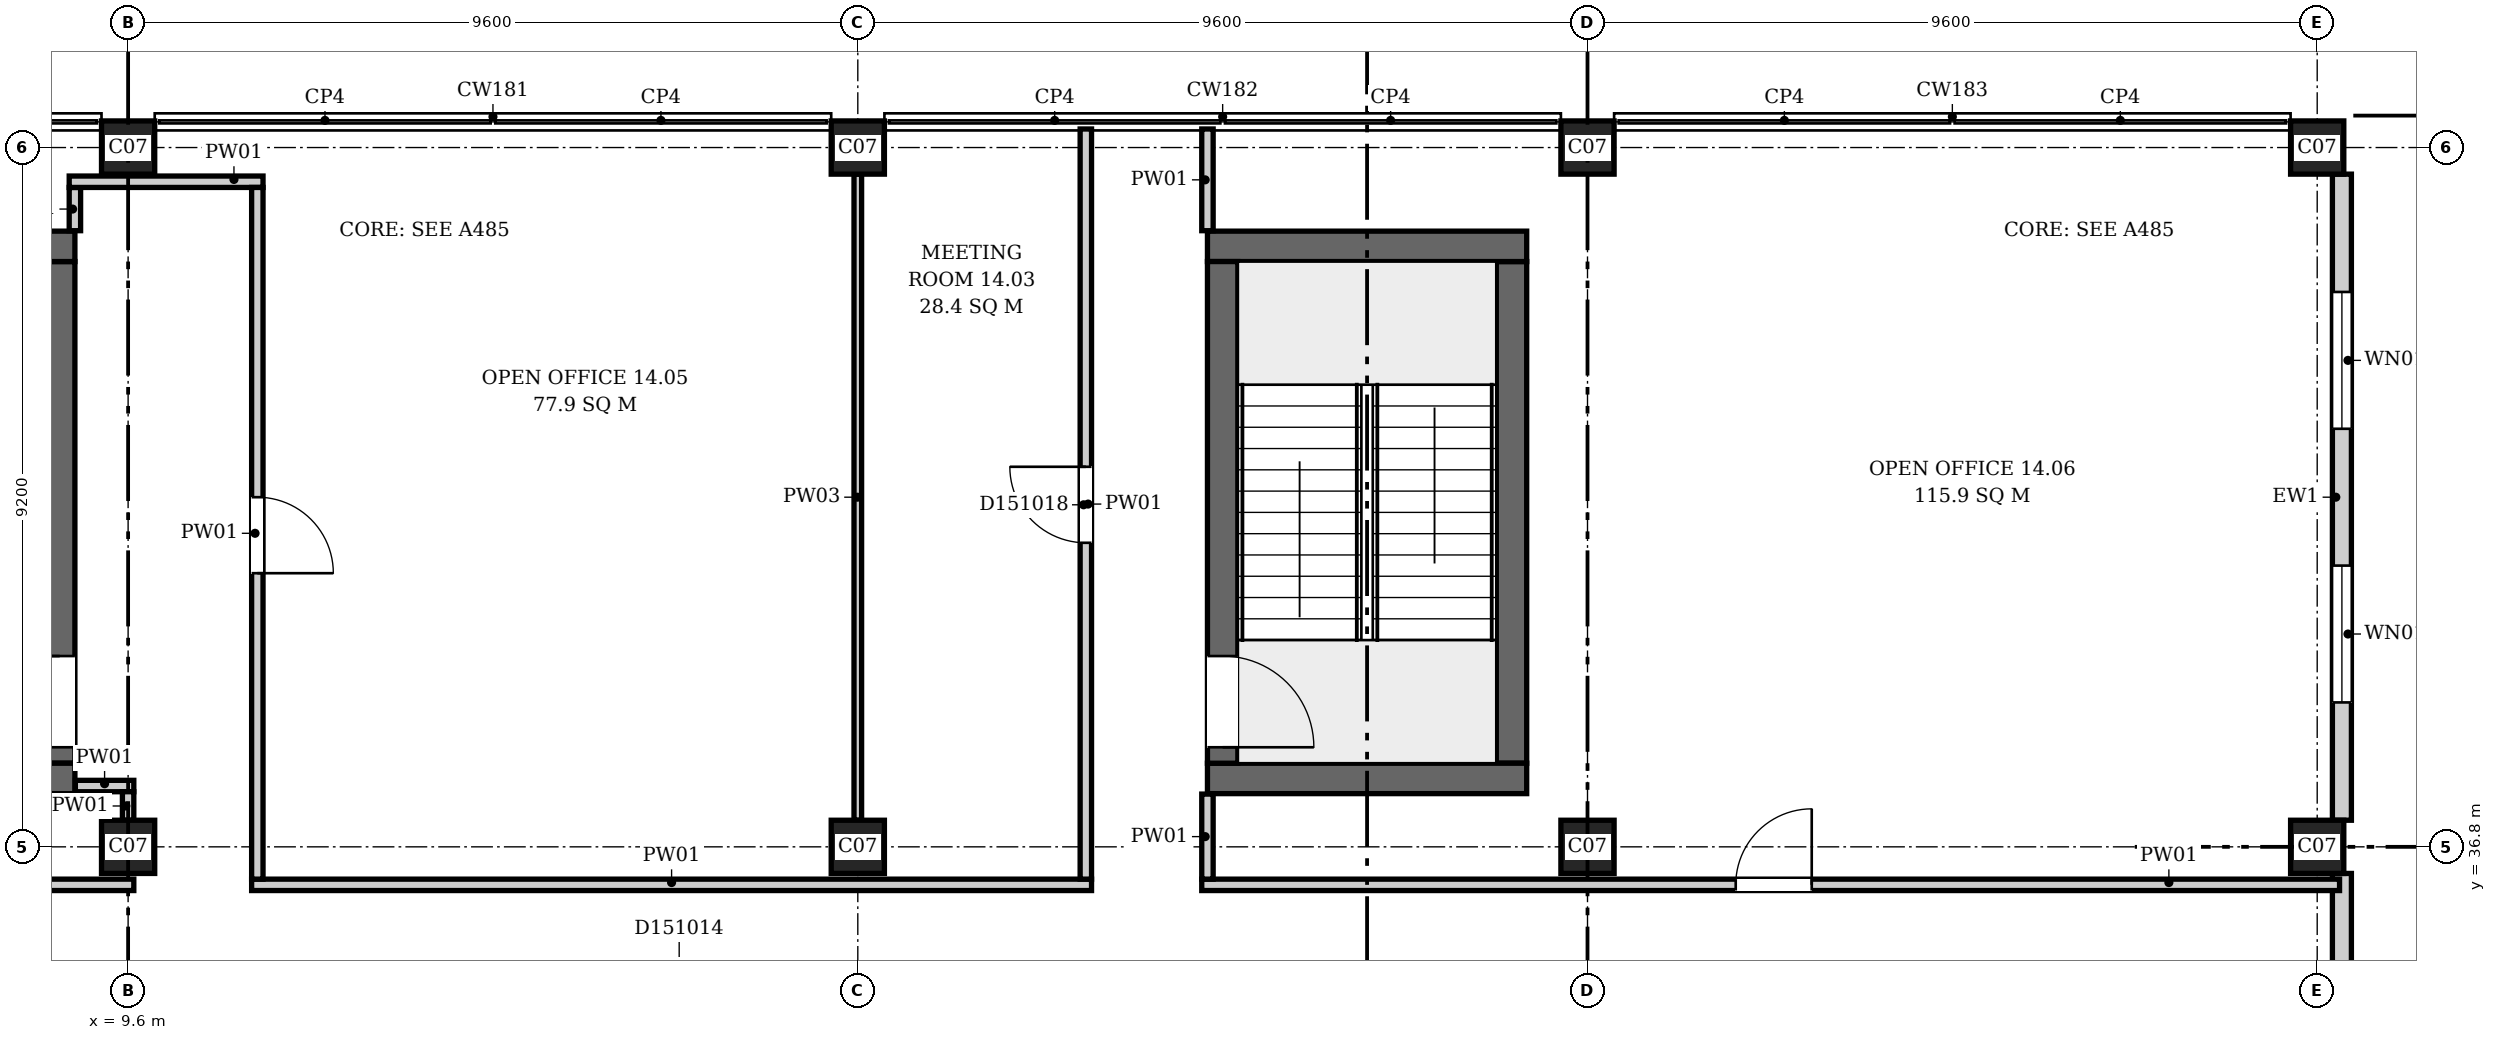
"""IFC4 building model, lengths in metres.
Left out: names, types, materials, properties, quantities, classifications, styles, units other than length and angle.
Written with IfcOpenShell. Run it as: python <this file> out.ifc"""

import sys

from ifc_helpers import new_model, si_unit, direction, frame, frame_2d, origin, origin_2d, place, context, subcontext, project, spatial, rectangle, extrude, element, fill, save


model = new_model("IFC4")
c1 = context("Model", 3, precision=1e-05, world=origin(), true_north=direction((0.0, 1.0)))
c2 = subcontext(c1, "Body", "Model", "MODEL_VIEW")
j1 = project(units=[si_unit("LENGTHUNIT", "METRE"), si_unit("PLANEANGLEUNIT", "RADIAN")], contexts=[c1])
p1 = place(None, origin())
s1 = spatial("IfcSite", under=j1, at=p1, CompositionType="ELEMENT")
p2 = place(p1, origin())
s2 = spatial("IfcBuilding", under=s1, at=p2, CompositionType="ELEMENT")
p3 = place(p2, frame((0.0, 0.0, 69.7)))
s3 = spatial("IfcBuildingStorey", under=s2, at=p3, CompositionType="ELEMENT", Elevation=69.7)
for number, where, z_axis, x_axis in (
    (1, (4.7, 37.7, 0.0), (0.0, 0.0, 1.0), (1.0, 0.0, 0.0)),
    (2, (4.7, 44.7, 0.0), (0.0, 0.0, 1.0), (1.0, 0.0, 0.0)),
):
    element("IfcWall", number, at=place(p3, frame(where, z_axis=z_axis, x_axis=x_axis)), inside=s3, PredefinedType="SHEAR", context=c2, shape_type="SweptSolid", body=[
        extrude(rectangle(XDim=4.2, YDim=0.4, at=frame_2d((2.1, 0.0))), origin(), (0.0, 0.0, 1.0), 4.2),
    ])
p4 = place(p3, frame((8.7, 37.9, 0.0), z_axis=(0.0, 0.0, 1.0), x_axis=(0.0, 1.0, 0.0)))
e3 = element("IfcWall", 3, at=p4, inside=s3, PredefinedType="SHEAR", context=c2, shape_type="SweptSolid", body=[
    extrude(rectangle(XDim=6.6, YDim=0.4, at=frame_2d((3.3, 0.0))), origin(), (0.0, 0.0, 1.0), 4.2),
])
p5 = place(p4, frame((0.21, 0.0, 0.0)))
e4 = element("IfcOpeningElement", 4, at=p5, cuts=e3, PredefinedType="OPENING", context=c2, shape_type="SweptSolid", body=[
    extrude(rectangle(XDim=1.2, YDim=2.1, at=frame_2d((0.6, 1.05))), frame((0.0, 0.21, 0.0), z_axis=(0.0, -1.0, 0.0), x_axis=(1.0, 0.0, 0.0)), (0.0, 0.0, 1.0), 0.42),
])
for number, where, z_axis, x_axis in (
    (5, (23.8, 37.7, 0.0), (0.0, 0.0, 1.0), (1.0, 0.0, 0.0)),
    (6, (23.8, 44.7, 0.0), (0.0, 0.0, 1.0), (1.0, 0.0, 0.0)),
):
    element("IfcWall", number, at=place(p3, frame(where, z_axis=z_axis, x_axis=x_axis)), inside=s3, PredefinedType="SHEAR", context=c2, shape_type="SweptSolid", body=[
        extrude(rectangle(XDim=4.2, YDim=0.4, at=frame_2d((2.1, 0.0))), origin(), (0.0, 0.0, 1.0), 4.2),
    ])
p6 = place(p3, frame((24.0, 37.9, 0.0), z_axis=(0.0, 0.0, 1.0), x_axis=(0.0, 1.0, 0.0)))
e7 = element("IfcWall", 7, at=p6, inside=s3, PredefinedType="SHEAR", context=c2, shape_type="SweptSolid", body=[
    extrude(rectangle(XDim=6.6, YDim=0.4, at=frame_2d((3.3, 0.0))), origin(), (0.0, 0.0, 1.0), 4.2),
])
p7 = place(p6, frame((0.21, 0.0, 0.0)))
e8 = element("IfcOpeningElement", 8, at=p7, cuts=e7, PredefinedType="OPENING", context=c2, shape_type="SweptSolid", body=[
    extrude(rectangle(XDim=1.2, YDim=2.1, at=frame_2d((0.6, 1.05))), frame((0.0, 0.21, 0.0), z_axis=(0.0, -1.0, 0.0), x_axis=(1.0, 0.0, 0.0)), (0.0, 0.0, 1.0), 0.42),
])
p8 = place(p3, frame((27.8, 37.9, 0.0), z_axis=(0.0, 0.0, 1.0), x_axis=(0.0, 1.0, 0.0)))
e9 = element("IfcWall", 9, at=p8, inside=s3, PredefinedType="SHEAR", context=c2, shape_type="SweptSolid", body=[
    extrude(rectangle(XDim=6.6, YDim=0.4, at=frame_2d((3.3, 0.0))), origin(), (0.0, 0.0, 1.0), 4.2),
])
for number, where, z_axis, x_axis in (
    (10, (9.6, 36.8, 0.0), (0.0, 0.0, 1.0), (1.0, 0.0, 0.0)),
    (11, (19.2, 36.8, 0.0), (0.0, 0.0, 1.0), (1.0, 0.0, 0.0)),
    (12, (28.8, 36.8, 0.0), (0.0, 0.0, 1.0), (1.0, 0.0, 0.0)),
    (13, (38.4, 36.8, 0.0), (0.0, 0.0, 1.0), (1.0, 0.0, 0.0)),
    (14, (9.6, 46.0, 0.0), (0.0, 0.0, 1.0), (1.0, 0.0, 0.0)),
    (15, (19.2, 46.0, 0.0), (0.0, 0.0, 1.0), (1.0, 0.0, 0.0)),
    (16, (28.8, 46.0, 0.0), (0.0, 0.0, 1.0), (1.0, 0.0, 0.0)),
    (17, (38.4, 46.0, 0.0), (0.0, 0.0, 1.0), (1.0, 0.0, 0.0)),
):
    element("IfcColumn", number, at=place(p3, frame(where, z_axis=z_axis, x_axis=x_axis)), inside=s3, PredefinedType="COLUMN", context=c2, shape_type="SweptSolid", body=[
        extrude(rectangle(XDim=0.7, YDim=0.7, at=origin_2d()), origin(), (0.0, 0.0, 1.0), 4.2),
    ])
p9 = place(p3, frame((38.725, 27.95, 0.0), z_axis=(0.0, 0.0, 1.0), x_axis=(0.0, 1.0, 0.0)))
e18 = element("IfcWall", 18, at=p9, inside=s3, PredefinedType="ELEMENTEDWALL", context=c2, shape_type="SweptSolid", body=[
    extrude(rectangle(XDim=8.5, YDim=0.25, at=frame_2d((4.25, 0.0))), origin(), (0.0, 0.0, 1.0), 3.9),
])
p10 = place(p9, frame((4.35, 0.0, 0.0)))
e19 = element("IfcOpeningElement", 19, at=p10, cuts=e18, PredefinedType="OPENING", context=c2, shape_type="SweptSolid", body=[
    extrude(rectangle(XDim=1.8, YDim=2.4, at=frame_2d((0.9, 1.2))), frame((0.0, 0.135, 0.0), z_axis=(0.0, -1.0, 0.0), x_axis=(1.0, 0.0, 0.0)), (0.0, 0.0, 1.0), 0.27),
])
p11 = place(p9, frame((1.55, 0.0, 0.9)))
e20 = element("IfcOpeningElement", 20, at=p11, cuts=e18, PredefinedType="OPENING", context=c2, shape_type="SweptSolid", body=[
    extrude(rectangle(XDim=1.8, YDim=2.6, at=frame_2d((0.9, 1.3))), frame((0.0, 0.135, 0.0), z_axis=(0.0, -1.0, 0.0), x_axis=(1.0, 0.0, 0.0)), (0.0, 0.0, 1.0), 0.27),
])
p12 = place(p3, frame((38.725, 37.15, 0.0), z_axis=(0.0, 0.0, 1.0), x_axis=(0.0, 1.0, 0.0)))
e21 = element("IfcWall", 21, at=p12, inside=s3, PredefinedType="ELEMENTEDWALL", context=c2, shape_type="SweptSolid", body=[
    extrude(rectangle(XDim=8.5, YDim=0.25, at=frame_2d((4.25, 0.0))), origin(), (0.0, 0.0, 1.0), 3.9),
])
p13 = place(p12, frame((1.55, 0.0, 0.9)))
e22 = element("IfcOpeningElement", 22, at=p13, cuts=e21, PredefinedType="OPENING", context=c2, shape_type="SweptSolid", body=[
    extrude(rectangle(XDim=1.8, YDim=2.6, at=frame_2d((0.9, 1.3))), frame((0.0, 0.135, 0.0), z_axis=(0.0, -1.0, 0.0), x_axis=(1.0, 0.0, 0.0)), (0.0, 0.0, 1.0), 0.27),
])
p14 = place(p12, frame((5.15, 0.0, 0.9)))
e23 = element("IfcOpeningElement", 23, at=p14, cuts=e21, PredefinedType="OPENING", context=c2, shape_type="SweptSolid", body=[
    extrude(rectangle(XDim=1.8, YDim=2.6, at=frame_2d((0.9, 1.3))), frame((0.0, 0.135, 0.0), z_axis=(0.0, -1.0, 0.0), x_axis=(1.0, 0.0, 0.0)), (0.0, 0.0, 1.0), 0.27),
])
p15 = place(p3, frame((-0.044, 36.3, 0.0), z_axis=(0.0, 0.0, 1.0), x_axis=(1.0, 0.0, 0.0)))
e24 = element("IfcWall", 24, at=p15, inside=s3, PredefinedType="PARTITIONING", context=c2, shape_type="SweptSolid", body=[
    extrude(rectangle(XDim=9.719, YDim=0.15, at=frame_2d((4.859, 0.0))), origin(), (0.0, 0.0, 1.0), 3.9),
])
p16 = place(p15, frame((3.744, 0.0, 0.0)))
e25 = element("IfcOpeningElement", 25, at=p16, cuts=e24, PredefinedType="OPENING", context=c2, shape_type="SweptSolid", body=[
    extrude(rectangle(XDim=1.0, YDim=2.1, at=frame_2d((0.5, 1.05))), frame((0.0, 0.085, 0.0), z_axis=(0.0, -1.0, 0.0), x_axis=(1.0, 0.0, 0.0)), (0.0, 0.0, 1.0), 0.17),
])
p17 = place(p3, frame((8.9, 44.906, 0.0), z_axis=(0.0, 0.0, 1.0), x_axis=(0.0, 1.0, 0.0)))
e26 = element("IfcWall", 26, at=p17, inside=s3, PredefinedType="PARTITIONING", context=c2, shape_type="SweptSolid", body=[
    extrude(rectangle(XDim=0.569, YDim=0.15, at=frame_2d((0.285, 0.0))), origin(), (0.0, 0.0, 1.0), 3.9),
])
p18 = place(p3, frame((8.825, 45.55, 0.0), z_axis=(0.0, 0.0, 1.0), x_axis=(1.0, 0.0, 0.0)))
e27 = element("IfcWall", 27, at=p18, inside=s3, PredefinedType="PARTITIONING", context=c2, shape_type="SweptSolid", body=[
    extrude(rectangle(XDim=2.55, YDim=0.15, at=frame_2d((1.275, 0.0))), origin(), (0.0, 0.0, 1.0), 3.9),
])
p19 = place(p3, frame((8.906, 37.6, 0.0), z_axis=(0.0, 0.0, 1.0), x_axis=(1.0, 0.0, 0.0)))
e28 = element("IfcWall", 28, at=p19, inside=s3, PredefinedType="PARTITIONING", context=c2, shape_type="SweptSolid", body=[
    extrude(rectangle(XDim=0.769, YDim=0.15, at=frame_2d((0.385, 0.0))), origin(), (0.0, 0.0, 1.0), 3.9),
])
p20 = place(p3, frame((9.6, 37.15, 0.0), z_axis=(0.0, 0.0, 1.0), x_axis=(0.0, 1.0, 0.0)))
e29 = element("IfcWall", 29, at=p20, inside=s3, PredefinedType="PARTITIONING", context=c2, shape_type="SweptSolid", body=[
    extrude(rectangle(XDim=0.375, YDim=0.15, at=frame_2d((0.188, 0.0))), origin(), (0.0, 0.0, 1.0), 3.9),
])
p21 = place(p3, frame((11.225, 36.3, 0.0), z_axis=(0.0, 0.0, 1.0), x_axis=(1.0, 0.0, 0.0)))
e30 = element("IfcWall", 30, at=p21, inside=s3, PredefinedType="PARTITIONING", context=c2, shape_type="SweptSolid", body=[
    extrude(rectangle(XDim=11.05, YDim=0.15, at=frame_2d((5.525, 0.0))), origin(), (0.0, 0.0, 1.0), 3.9),
])
p22 = place(p3, frame((11.3, 36.375, 0.0), z_axis=(0.0, 0.0, 1.0), x_axis=(0.0, 1.0, 0.0)))
e31 = element("IfcWall", 31, at=p22, inside=s3, PredefinedType="PARTITIONING", context=c2, shape_type="SweptSolid", body=[
    extrude(rectangle(XDim=9.1, YDim=0.15, at=frame_2d((4.55, 0.0))), origin(), (0.0, 0.0, 1.0), 3.9),
])
p23 = place(p22, frame((4.025, 0.0, 0.0)))
e32 = element("IfcOpeningElement", 32, at=p23, cuts=e31, PredefinedType="OPENING", context=c2, shape_type="SweptSolid", body=[
    extrude(rectangle(XDim=1.0, YDim=2.1, at=frame_2d((0.5, 1.05))), frame((0.0, 0.085, 0.0), z_axis=(0.0, -1.0, 0.0), x_axis=(1.0, 0.0, 0.0)), (0.0, 0.0, 1.0), 0.17),
])
p24 = place(p3, frame((19.2, 37.15, 0.0), z_axis=(0.0, 0.0, 1.0), x_axis=(0.0, 1.0, 0.0)))
e33 = element("IfcWall", 33, at=p24, inside=s3, PredefinedType="PARTITIONING", context=c2, shape_type="SweptSolid", body=[
    extrude(rectangle(XDim=8.5, YDim=0.1, at=frame_2d((4.25, 0.0))), origin(), (0.0, 0.0, 1.0), 3.9),
])
p25 = place(p3, frame((22.2, 36.375, 0.0), z_axis=(0.0, 0.0, 1.0), x_axis=(0.0, 1.0, 0.0)))
e34 = element("IfcWall", 34, at=p25, inside=s3, PredefinedType="PARTITIONING", context=c2, shape_type="SweptSolid", body=[
    extrude(rectangle(XDim=9.869, YDim=0.15, at=frame_2d((4.935, 0.0))), origin(), (0.0, 0.0, 1.0), 3.9),
])
p26 = place(p25, frame((4.425, 0.0, 0.0)))
e35 = element("IfcOpeningElement", 35, at=p26, cuts=e34, PredefinedType="OPENING", context=c2, shape_type="SweptSolid", body=[
    extrude(rectangle(XDim=1.0, YDim=2.1, at=frame_2d((0.5, 1.05))), frame((0.0, 0.085, 0.0), z_axis=(0.0, -1.0, 0.0), x_axis=(1.0, 0.0, 0.0)), (0.0, 0.0, 1.0), 0.17),
])
p27 = place(p3, frame((23.725, 36.3, 0.0), z_axis=(0.0, 0.0, 1.0), x_axis=(1.0, 0.0, 0.0)))
e36 = element("IfcWall", 36, at=p27, inside=s3, PredefinedType="PARTITIONING", context=c2, shape_type="SweptSolid", body=[
    extrude(rectangle(XDim=14.969, YDim=0.15, at=frame_2d((7.484, 0.0))), origin(), (0.0, 0.0, 1.0), 3.9),
])
p28 = place(p27, frame((7.025, 0.0, 0.0)))
e37 = element("IfcOpeningElement", 37, at=p28, cuts=e36, PredefinedType="OPENING", context=c2, shape_type="SweptSolid", body=[
    extrude(rectangle(XDim=1.0, YDim=2.1, at=frame_2d((0.5, 1.05))), frame((0.0, 0.085, 0.0), z_axis=(0.0, -1.0, 0.0), x_axis=(1.0, 0.0, 0.0)), (0.0, 0.0, 1.0), 0.17),
])
p29 = place(p3, frame((23.8, 36.375, 0.0), z_axis=(0.0, 0.0, 1.0), x_axis=(0.0, 1.0, 0.0)))
e38 = element("IfcWall", 38, at=p29, inside=s3, PredefinedType="PARTITIONING", context=c2, shape_type="SweptSolid", body=[
    extrude(rectangle(XDim=1.119, YDim=0.15, at=frame_2d((0.56, 0.0))), origin(), (0.0, 0.0, 1.0), 3.9),
])
p30 = place(p3, frame((23.8, 44.906, 0.0), z_axis=(0.0, 0.0, 1.0), x_axis=(0.0, 1.0, 0.0)))
e39 = element("IfcWall", 39, at=p30, inside=s3, PredefinedType="PARTITIONING", context=c2, shape_type="SweptSolid", body=[
    extrude(rectangle(XDim=1.338, YDim=0.15, at=frame_2d((0.669, 0.0))), origin(), (0.0, 0.0, 1.0), 3.9),
])
p31 = place(p13, origin())
e40 = element("IfcWindow", 40, at=p31, inside=s3, PartitioningType="SINGLE_PANEL", PredefinedType="WINDOW", context=c2, shape_type="SweptSolid", body=[
    extrude(rectangle(XDim=1.8, YDim=2.6, at=frame_2d((0.9, 1.3))), frame((0.0, 0.03, 0.0), z_axis=(0.0, -1.0, 0.0), x_axis=(1.0, 0.0, 0.0)), (0.0, 0.0, 1.0), 0.06),
])
fill(e22, e40)
p32 = place(p14, origin())
e41 = element("IfcWindow", 41, at=p32, inside=s3, PartitioningType="SINGLE_PANEL", PredefinedType="WINDOW", context=c2, shape_type="SweptSolid", body=[
    extrude(rectangle(XDim=1.8, YDim=2.6, at=frame_2d((0.9, 1.3))), frame((0.0, 0.03, 0.0), z_axis=(0.0, -1.0, 0.0), x_axis=(1.0, 0.0, 0.0)), (0.0, 0.0, 1.0), 0.06),
])
fill(e23, e41)
p33 = place(p5, origin())
e42 = element("IfcDoor", 42, at=p33, inside=s3, OperationType="SINGLE_SWING_RIGHT", PredefinedType="DOOR", context=c2, shape_type="SweptSolid", body=[
    extrude(rectangle(XDim=1.2, YDim=2.1, at=frame_2d((0.6, 1.05))), frame((0.0, 0.025, 0.0), z_axis=(0.0, -1.0, 0.0), x_axis=(1.0, 0.0, 0.0)), (0.0, 0.0, 1.0), 0.05),
])
fill(e4, e42)
p34 = place(p7, origin())
e43 = element("IfcDoor", 43, at=p34, inside=s3, OperationType="SINGLE_SWING_LEFT", PredefinedType="DOOR", context=c2, shape_type="SweptSolid", body=[
    extrude(rectangle(XDim=1.2, YDim=2.1, at=frame_2d((0.6, 1.05))), frame((0.0, 0.025, 0.0), z_axis=(0.0, -1.0, 0.0), x_axis=(1.0, 0.0, 0.0)), (0.0, 0.0, 1.0), 0.05),
])
fill(e8, e43)
p35 = place(p23, origin())
e44 = element("IfcDoor", 44, at=p35, inside=s3, OperationType="SINGLE_SWING_LEFT", PredefinedType="DOOR", context=c2, shape_type="SweptSolid", body=[
    extrude(rectangle(XDim=1.0, YDim=2.1, at=frame_2d((0.5, 1.05))), frame((0.0, 0.025, 0.0), z_axis=(0.0, -1.0, 0.0), x_axis=(1.0, 0.0, 0.0)), (0.0, 0.0, 1.0), 0.05),
])
fill(e32, e44)
p36 = place(p26, origin())
e45 = element("IfcDoor", 45, at=p36, inside=s3, OperationType="SINGLE_SWING_RIGHT", PredefinedType="DOOR", context=c2, shape_type="SweptSolid", body=[
    extrude(rectangle(XDim=1.0, YDim=2.1, at=frame_2d((0.5, 1.05))), frame((0.0, 0.025, 0.0), z_axis=(0.0, -1.0, 0.0), x_axis=(1.0, 0.0, 0.0)), (0.0, 0.0, 1.0), 0.05),
])
fill(e35, e45)
p37 = place(p28, origin())
e46 = element("IfcDoor", 46, at=p37, inside=s3, OperationType="SINGLE_SWING_RIGHT", PredefinedType="DOOR", context=c2, shape_type="SweptSolid", body=[
    extrude(rectangle(XDim=1.0, YDim=2.1, at=frame_2d((0.5, 1.05))), frame((0.0, 0.025, 0.0), z_axis=(0.0, -1.0, 0.0), x_axis=(1.0, 0.0, 0.0)), (0.0, 0.0, 1.0), 0.05),
])
fill(e37, e46)
save(model, sys.argv[1])
